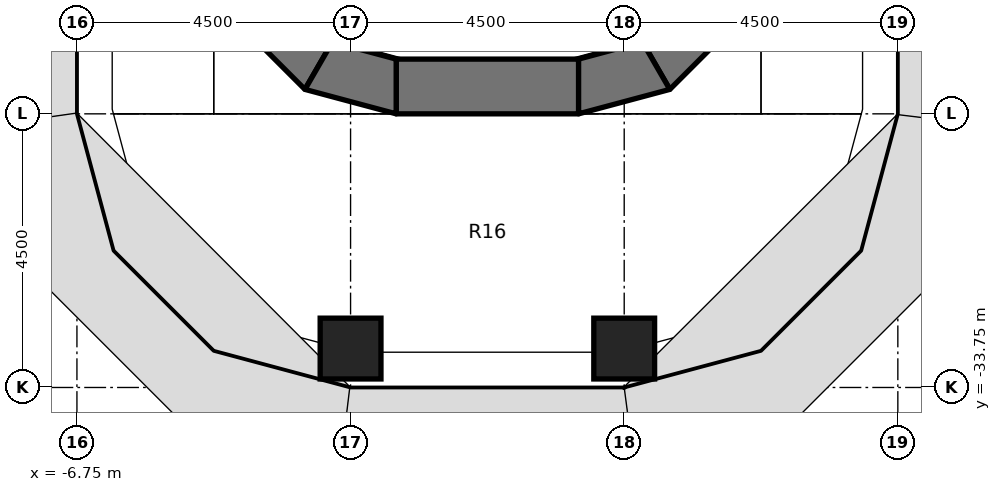
"""IFC4 building model, lengths in metres.
Left out: names, types, materials, properties, quantities, classifications, styles, units other than length and angle.
Written with IfcOpenShell. Run it as: python <this file> out.ifc"""

import sys

from ifc_helpers import new_model, si_unit, direction, frame, frame_2d, origin, origin_2d, place, context, subcontext, project, spatial, polyline, rectangle, outline, extrude, element, save


model = new_model("IFC4")
c1 = context("Model", 3, precision=1e-05, world=origin(), true_north=direction((0.0, 1.0)))
c2 = subcontext(c1, "Body", "Model", "MODEL_VIEW")
j1 = project(units=[si_unit("LENGTHUNIT", "METRE"), si_unit("PLANEANGLEUNIT", "RADIAN")], contexts=[c1])
p1 = place(None, origin())
s1 = spatial("IfcSite", under=j1, at=p1, CompositionType="ELEMENT")
p2 = place(p1, origin())
s2 = spatial("IfcBuilding", under=s1, at=p2, CompositionType="ELEMENT")
p3 = place(p2, frame((0.0, 0.0, 43.8)))
s3 = spatial("IfcBuildingStorey", under=s2, at=p3, CompositionType="ELEMENT", Elevation=43.8)
for number, where, z_axis, x_axis in (
    (1, (-2.25, -33.11, 0.0), (0.0, 0.0, 1.0), (1.0, 0.0, 0.0)),
    (2, (2.25, -33.11, 0.0), (0.0, 0.0, 1.0), (1.0, 0.0, 0.0)),
):
    element("IfcColumn", number, at=place(p3, frame(where, z_axis=z_axis, x_axis=x_axis)), inside=s3, PredefinedType="COLUMN", context=c2, shape_type="SweptSolid", body=[
        extrude(rectangle(XDim=1.0, YDim=1.0, at=origin_2d()), origin(), (0.0, 0.0, 1.0), 4.05),
    ])
p4 = place(p3, frame((-1.5, -28.8, 0.0), z_axis=(0.0, 0.0, 1.0), x_axis=(1.0, 0.0, 0.0)))
e3 = element("IfcWall", 3, at=p4, inside=s3, PredefinedType="SHEAR", context=c2, shape_type="SweptSolid", body=[
    extrude(rectangle(XDim=3.0, YDim=0.9, at=frame_2d((1.5, 0.0))), origin(), (0.0, 0.0, 1.0), 4.2),
])
p5 = place(p3, origin())
e4 = element("IfcWall", 4, at=p5, inside=s3, PredefinedType="SHEAR", context=c2, shape_type="SweptSolid", body=[
    extrude(outline(polyline([(-4.098, -27.75), (-3.0, -28.848), (-2.55, -28.069), (-3.319, -27.3), (-4.098, -27.75)])), origin(), (0.0, 0.0, 1.0), 4.2),
])
p6 = place(p3, origin())
e5 = element("IfcWall", 5, at=p6, inside=s3, PredefinedType="SHEAR", context=c2, shape_type="SweptSolid", body=[
    extrude(outline(polyline([(-3.0, -28.848), (-1.5, -29.25), (-1.5, -28.35), (-2.55, -28.069), (-3.0, -28.848)])), origin(), (0.0, 0.0, 1.0), 4.2),
])
p7 = place(p3, origin())
e6 = element("IfcWall", 6, at=p7, inside=s3, PredefinedType="SHEAR", context=c2, shape_type="SweptSolid", body=[
    extrude(outline(polyline([(4.098, -27.75), (3.0, -28.848), (2.55, -28.069), (3.319, -27.3), (4.098, -27.75)])), origin(), (0.0, 0.0, 1.0), 4.2),
])
p8 = place(p3, origin())
e7 = element("IfcWall", 7, at=p8, inside=s3, PredefinedType="SHEAR", context=c2, shape_type="SweptSolid", body=[
    extrude(outline(polyline([(3.0, -28.848), (1.5, -29.25), (1.5, -28.35), (2.55, -28.069), (3.0, -28.848)])), origin(), (0.0, 0.0, 1.0), 4.2),
])
save(model, sys.argv[1])
